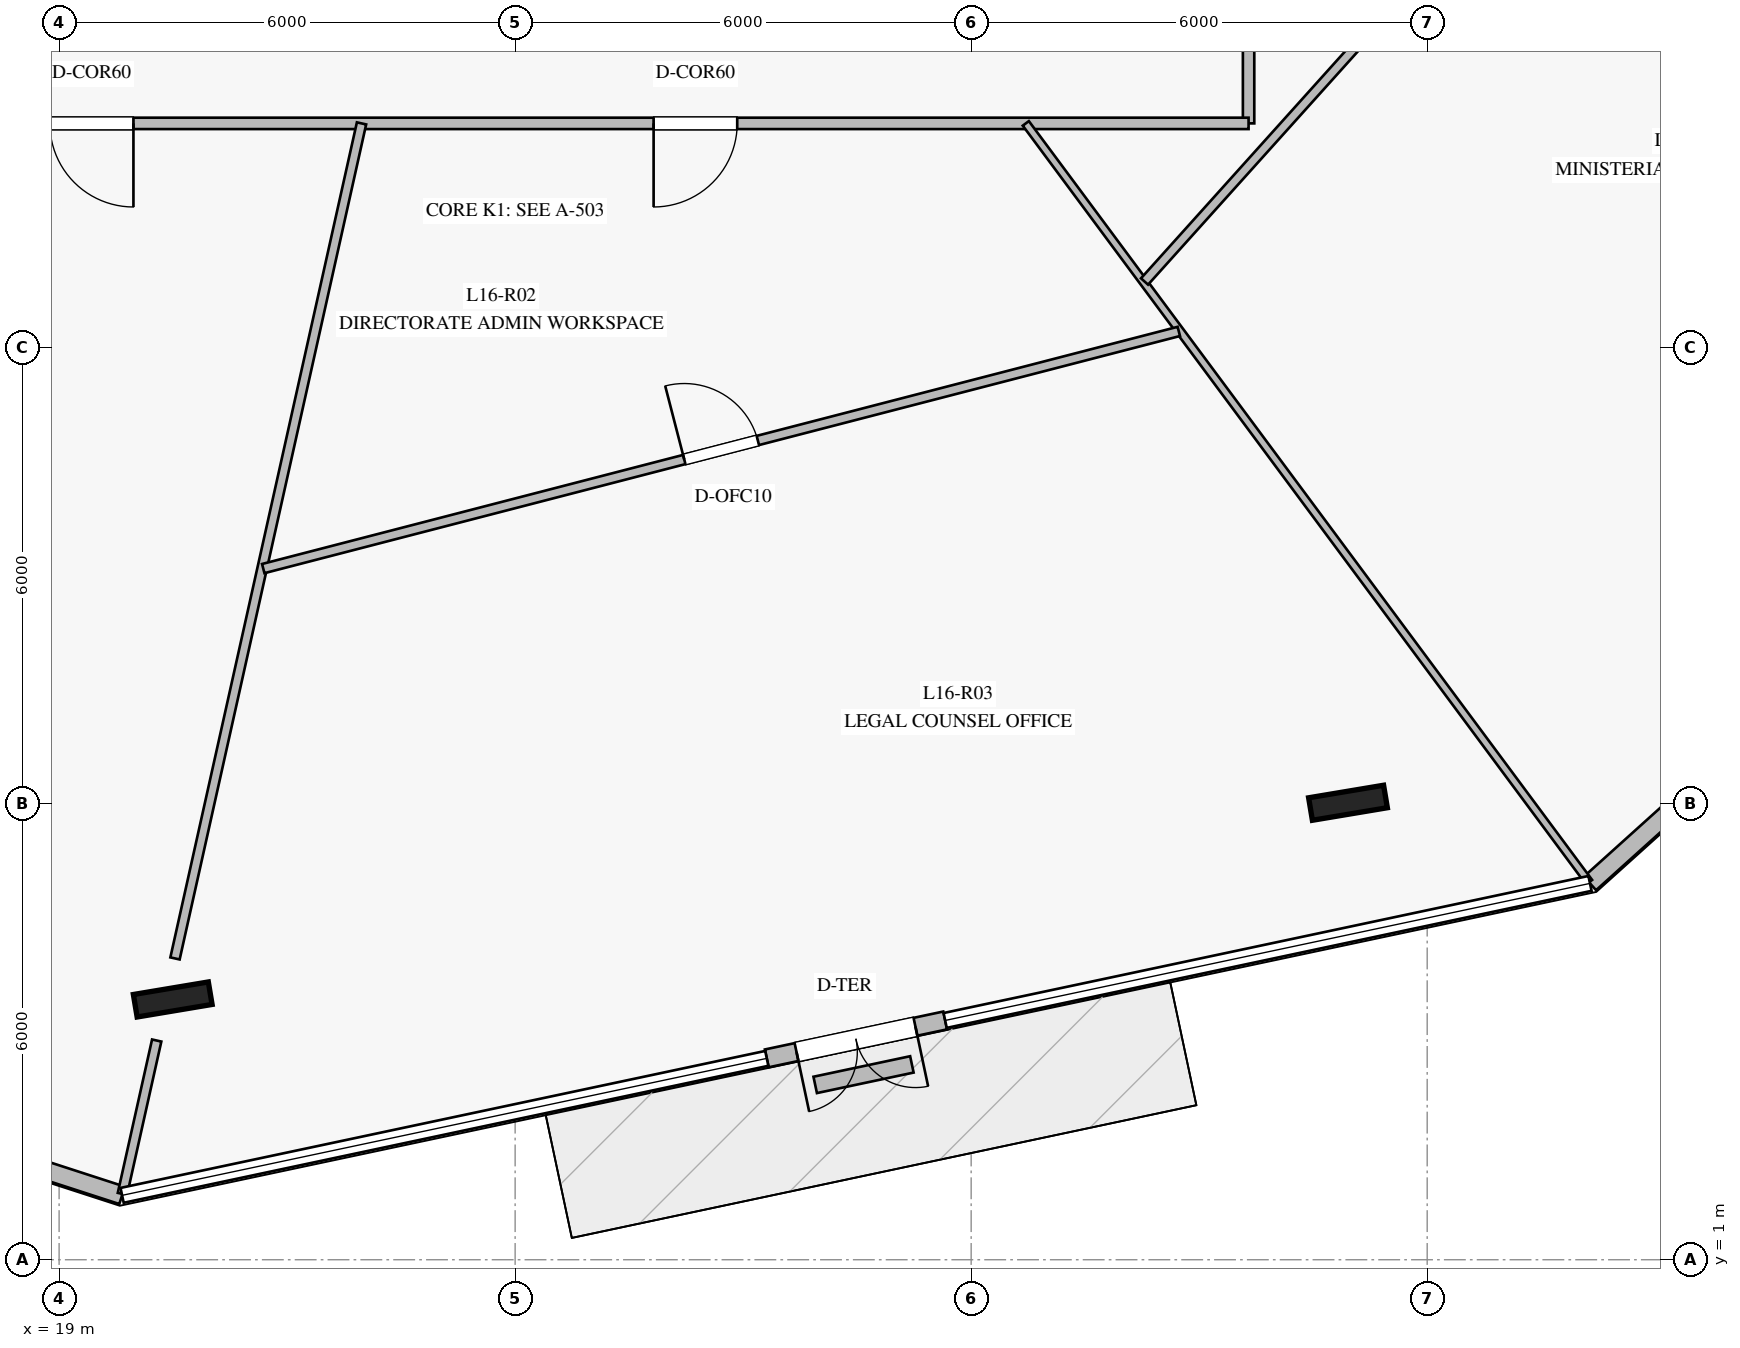
"""IFC4 building model, lengths in metres.
Left out: names, types, materials, properties, quantities, classifications, styles, units other than length and angle.
Written with IfcOpenShell. Run it as: python <this file> out.ifc"""

import sys

from ifc_helpers import new_model, si_unit, direction, frame, frame_2d, origin, origin_2d, place, context, subcontext, project, spatial, rectangle, i_section, extrude, element, fill, save


model = new_model("IFC4")
c1 = context("Model", 3, precision=1e-05, world=origin(), true_north=direction((0.0, 1.0)))
c2 = subcontext(c1, "Body", "Model", "MODEL_VIEW")
j1 = project(units=[si_unit("LENGTHUNIT", "METRE"), si_unit("PLANEANGLEUNIT", "RADIAN")], contexts=[c1])
p1 = place(None, origin())
s1 = spatial("IfcSite", under=j1, at=p1, CompositionType="ELEMENT")
p2 = place(p1, origin())
s2 = spatial("IfcBuilding", under=s1, at=p2, CompositionType="ELEMENT")
p3 = place(p2, frame((0.0, 0.0, 68.0)))
s3 = spatial("IfcBuildingStorey", under=s2, at=p3, CompositionType="ELEMENT", Elevation=68.0)
for number, where, z_axis, x_axis in (
    (1, (20.495, 4.424, 0.0), (0.0, 0.0, 1.0), (0.986, 0.165, 0.0)),
    (2, (35.958, 7.012, 0.0), (0.0, 0.0, 1.0), (0.986, 0.165, 0.0)),
    (3, (40.567, 10.811, 0.0), (0.0, 0.0, 1.0), (0.35, 0.937, 0.0)),
):
    element("IfcColumn", number, at=place(p3, frame(where, z_axis=z_axis, x_axis=x_axis)), inside=s3, PredefinedType="COLUMN", context=c2, shape_type="SweptSolid", body=[
        extrude(i_section(OverallWidth=0.3, OverallDepth=1.0, WebThickness=0.019, FlangeThickness=0.036, at=origin_2d()), origin(), (0.0, 0.0, 1.0), 4.0),
    ])
p4 = place(p3, frame((15.575, 3.228, 0.0), z_axis=(0.0, 0.0, 1.0), x_axis=(0.951132297172, -0.308783667438, 0.0)))
e4 = element("IfcWall", 4, at=p4, inside=s3, PredefinedType="STANDARD", context=c2, shape_type="SweptSolid", body=[
    extrude(rectangle(XDim=4.473, YDim=0.24, at=frame_2d((2.236, 0.0))), origin(), (0.0, 0.0, 1.0), 3.76),
])
p5 = place(p3, frame((28.311, 3.649, 0.0), z_axis=(0.0, 0.0, 1.0), x_axis=(0.9781332422, 0.207979230943, 0.0)))
e5 = element("IfcWall", 5, at=p5, inside=s3, PredefinedType="STANDARD", context=c2, shape_type="SweptSolid", body=[
    extrude(rectangle(XDim=2.399, YDim=0.24, at=frame_2d((1.2, 0.0))), origin(), (0.0, 0.0, 1.0), 3.76),
])
p6 = place(p5, frame((0.4, 0.0, 0.0)))
e6 = element("IfcOpeningElement", 6, at=p6, cuts=e5, PredefinedType="OPENING", context=c2, shape_type="SweptSolid", body=[
    extrude(rectangle(XDim=1.6, YDim=2.25, at=frame_2d((0.8, 1.125))), frame((0.0, 0.13, 0.0), z_axis=(0.0, -1.0, 0.0), x_axis=(1.0, 0.0, 0.0)), (0.0, 0.0, 1.0), 0.26),
])
p7 = place(p3, frame((39.142, 5.951, 0.0), z_axis=(0.0, 0.0, 1.0), x_axis=(0.743009154356, 0.669281253692, 0.0)))
e7 = element("IfcWall", 7, at=p7, inside=s3, PredefinedType="STANDARD", context=c2, shape_type="SweptSolid", body=[
    extrude(rectangle(XDim=4.474, YDim=0.24, at=frame_2d((2.237, 0.0))), origin(), (0.0, 0.0, 1.0), 3.76),
])
p8 = place(p3, frame((28.948, 3.3, 0.0), z_axis=(0.0, 0.0, 1.0), x_axis=(0.978201775866, 0.20765665338, 0.0)))
e8 = element("IfcWall", 8, at=p8, inside=s3, PredefinedType="USERDEFINED", context=c2, shape_type="SweptSolid", body=[
    extrude(rectangle(XDim=1.3, YDim=0.22, at=frame_2d((0.65, 0.0))), origin(), (0.0, 0.0, 1.0), 0.4),
])
p9 = place(p3, frame((34.65, 34.05, 0.0), z_axis=(0.0, 0.0, 1.0), x_axis=(0.0, -1.0, 0.0)))
e9 = element("IfcWall", 9, at=p9, inside=s3, PredefinedType="PARTITIONING", context=c2, shape_type="SweptSolid", body=[
    extrude(rectangle(XDim=18.1, YDim=0.15, at=frame_2d((9.05, 0.0))), origin(), (0.0, 0.0, 1.0), 3.21),
])
p10 = place(p9, frame((13.276, 0.0, 0.0)))
e10 = element("IfcOpeningElement", 10, at=p10, cuts=e9, PredefinedType="OPENING", context=c2, shape_type="SweptSolid", body=[
    extrude(rectangle(XDim=1.1, YDim=2.2, at=frame_2d((0.55, 1.1))), frame((0.0, 0.085, 0.0), z_axis=(0.0, -1.0, 0.0), x_axis=(1.0, 0.0, 0.0)), (0.0, 0.0, 1.0), 0.17),
])
p11 = place(p3, frame((34.65, 15.95, 0.0), z_axis=(0.0, 0.0, 1.0), x_axis=(-1.0, 0.0, 0.0)))
e11 = element("IfcWall", 11, at=p11, inside=s3, PredefinedType="PARTITIONING", context=c2, shape_type="SweptSolid", body=[
    extrude(rectangle(XDim=19.3, YDim=0.15, at=frame_2d((9.65, 0.0))), origin(), (0.0, 0.0, 1.0), 3.21),
])
p12 = place(p11, frame((14.672, 0.0, 0.0)))
e12 = element("IfcOpeningElement", 12, at=p12, cuts=e11, PredefinedType="OPENING", context=c2, shape_type="SweptSolid", body=[
    extrude(rectangle(XDim=1.1, YDim=2.2, at=frame_2d((0.55, 1.1))), frame((0.0, 0.085, 0.0), z_axis=(0.0, -1.0, 0.0), x_axis=(1.0, 0.0, 0.0)), (0.0, 0.0, 1.0), 0.17),
])
p13 = place(p11, frame((6.728, 0.0, 0.0)))
e13 = element("IfcOpeningElement", 13, at=p13, cuts=e11, PredefinedType="OPENING", context=c2, shape_type="SweptSolid", body=[
    extrude(rectangle(XDim=1.1, YDim=2.2, at=frame_2d((0.55, 1.1))), frame((0.0, 0.085, 0.0), z_axis=(0.0, -1.0, 0.0), x_axis=(1.0, 0.0, 0.0)), (0.0, 0.0, 1.0), 0.17),
])
p14 = place(p3, frame((22.979, 15.95, 0.0), z_axis=(0.0, 0.0, 1.0), x_axis=(-0.218014245953, -0.975945586886, 0.0)))
e14 = element("IfcWall", 14, at=p14, inside=s3, PredefinedType="PARTITIONING", context=c2, shape_type="SweptSolid", body=[
    extrude(rectangle(XDim=11.257, YDim=0.125, at=frame_2d((5.628, 0.0))), origin(), (0.0, 0.0, 1.0), 3.21),
])
p15 = place(p3, frame((20.284, 3.884, 0.0), z_axis=(0.0, 0.0, 1.0), x_axis=(-0.218067911201, -0.97593359718, 0.0)))
e15 = element("IfcWall", 15, at=p15, inside=s3, PredefinedType="PARTITIONING", context=c2, shape_type="SweptSolid", body=[
    extrude(rectangle(XDim=2.068, YDim=0.125, at=frame_2d((1.034, 0.0))), origin(), (0.0, 0.0, 1.0), 3.76),
])
p16 = place(p3, frame((31.719, 15.95, 0.0), z_axis=(0.0, 0.0, 1.0), x_axis=(0.596065473306, -0.802935832762, 0.0)))
e16 = element("IfcWall", 16, at=p16, inside=s3, PredefinedType="MOVABLE", context=c2, shape_type="SweptSolid", body=[
    extrude(rectangle(XDim=12.433, YDim=0.1, at=frame_2d((6.217, 0.0))), origin(), (0.0, 0.0, 1.0), 3.06),
])
p17 = place(p3, frame((21.686, 10.093, 0.0), z_axis=(0.0, 0.0, 1.0), x_axis=(0.968058125552, 0.250725877309, 0.0)))
e17 = element("IfcWall", 17, at=p17, inside=s3, PredefinedType="PARTITIONING", context=c2, shape_type="SweptSolid", body=[
    extrude(rectangle(XDim=12.443, YDim=0.125, at=frame_2d((6.222, 0.0))), origin(), (0.0, 0.0, 1.0), 3.76),
])
p18 = place(p17, frame((5.722, 0.0, 0.0)))
e18 = element("IfcOpeningElement", 18, at=p18, cuts=e17, PredefinedType="OPENING", context=c2, shape_type="SweptSolid", body=[
    extrude(rectangle(XDim=1.0, YDim=2.15, at=frame_2d((0.5, 1.075))), frame((0.0, 0.073, 0.0), z_axis=(0.0, -1.0, 0.0), x_axis=(1.0, 0.0, 0.0)), (0.0, 0.0, 1.0), 0.145),
])
p19 = place(p3, frame((33.281, 13.87, 0.0), z_axis=(0.0, 0.0, 1.0), x_axis=(0.668723423756, 0.74351125245, 0.0)))
e19 = element("IfcWall", 19, at=p19, inside=s3, PredefinedType="PARTITIONING", context=c2, shape_type="SweptSolid", body=[
    extrude(rectangle(XDim=12.914, YDim=0.125, at=frame_2d((6.457, 0.0))), origin(), (0.0, 0.0, 1.0), 3.21),
])
p20 = place(p19, frame((5.868, 0.0, 0.0)))
e20 = element("IfcOpeningElement", 20, at=p20, cuts=e19, PredefinedType="OPENING", context=c2, shape_type="SweptSolid", body=[
    extrude(rectangle(XDim=1.0, YDim=2.15, at=frame_2d((0.5, 1.075))), frame((0.0, 0.073, 0.0), z_axis=(0.0, -1.0, 0.0), x_axis=(1.0, 0.0, 0.0)), (0.0, 0.0, 1.0), 0.145),
])
p21 = place(p6, frame((1.6, 0.0, 0.0), z_axis=(0.0, 0.0, 1.0), x_axis=(-1.0, 0.0, 0.0)))
e21 = element("IfcDoor", 21, at=p21, inside=s3, OperationType="DOUBLE_DOOR_SINGLE_SWING", PredefinedType="DOOR", context=c2, shape_type="SweptSolid", body=[
    extrude(rectangle(XDim=1.6, YDim=2.25, at=frame_2d((0.8, 1.125))), frame((0.0, 0.025, 0.0), z_axis=(0.0, -1.0, 0.0), x_axis=(1.0, 0.0, 0.0)), (0.0, 0.0, 1.0), 0.05),
])
fill(e6, e21)
p22 = place(p12, origin())
e22 = element("IfcDoor", 22, at=p22, inside=s3, OperationType="SINGLE_SWING_LEFT", PredefinedType="DOOR", context=c2, shape_type="SweptSolid", body=[
    extrude(rectangle(XDim=1.1, YDim=2.2, at=frame_2d((0.55, 1.1))), frame((0.0, 0.025, 0.0), z_axis=(0.0, -1.0, 0.0), x_axis=(1.0, 0.0, 0.0)), (0.0, 0.0, 1.0), 0.05),
])
fill(e12, e22)
p23 = place(p13, origin())
e23 = element("IfcDoor", 23, at=p23, inside=s3, OperationType="SINGLE_SWING_RIGHT", PredefinedType="DOOR", context=c2, shape_type="SweptSolid", body=[
    extrude(rectangle(XDim=1.1, YDim=2.2, at=frame_2d((0.55, 1.1))), frame((0.0, 0.025, 0.0), z_axis=(0.0, -1.0, 0.0), x_axis=(1.0, 0.0, 0.0)), (0.0, 0.0, 1.0), 0.05),
])
fill(e13, e23)
p24 = place(p18, origin())
e24 = element("IfcDoor", 24, at=p24, inside=s3, OperationType="SINGLE_SWING_LEFT", PredefinedType="DOOR", context=c2, shape_type="SweptSolid", body=[
    extrude(rectangle(XDim=1.0, YDim=2.15, at=frame_2d((0.5, 1.075))), frame((0.0, 0.025, 0.0), z_axis=(0.0, -1.0, 0.0), x_axis=(1.0, 0.0, 0.0)), (0.0, 0.0, 1.0), 0.05),
])
fill(e18, e24)
save(model, sys.argv[1])
